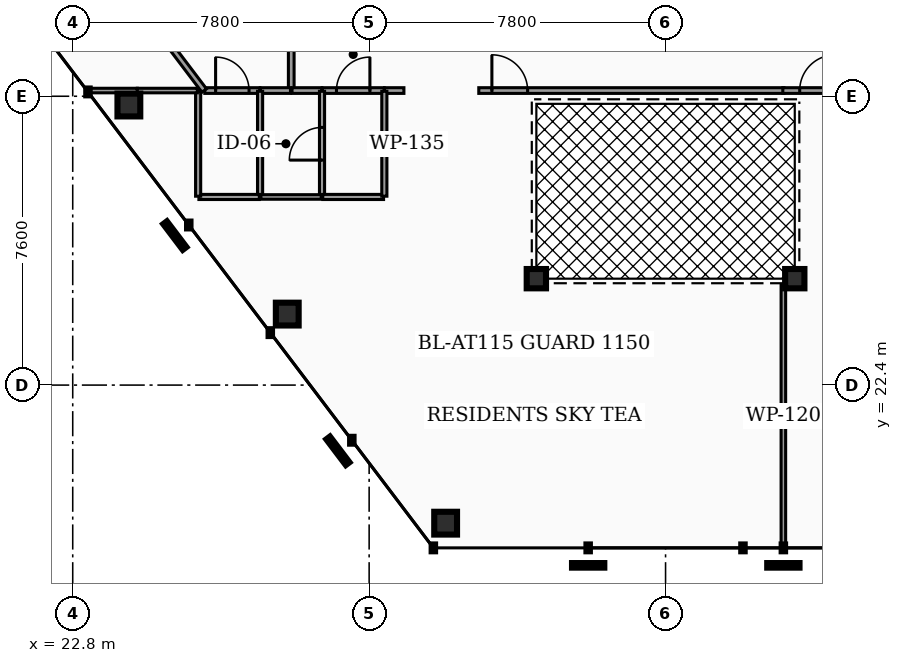
"""IFC4 building model, lengths in metres.
Left out: names, types, materials, properties, quantities, classifications, styles, units other than length and angle.
Written with IfcOpenShell. Run it as: python <this file> out.ifc"""

import sys

from ifc_helpers import new_model, si_unit, direction, frame, frame_2d, origin, origin_2d, place, context, subcontext, project, spatial, rectangle, hollow_rectangle, hollow_circle, extrude, element, fill, save


model = new_model("IFC4")
c1 = context("Model", 3, precision=1e-05, world=origin(), true_north=direction((0.0, 1.0)))
c2 = subcontext(c1, "Body", "Model", "MODEL_VIEW")
j1 = project(units=[si_unit("LENGTHUNIT", "METRE"), si_unit("PLANEANGLEUNIT", "RADIAN")], contexts=[c1])
p1 = place(None, origin())
s1 = spatial("IfcSite", under=j1, at=p1, CompositionType="ELEMENT")
p2 = place(p1, origin())
s2 = spatial("IfcBuilding", under=s1, at=p2, CompositionType="ELEMENT")
p3 = place(p2, frame((0.0, 0.0, 218.96)))
s3 = spatial("IfcBuildingStorey", under=s2, at=p3, CompositionType="ELEMENT", Elevation=218.96)
for number, where, z_axis, x_axis in (
    (1, (24.278, 29.769, 0.0), (0.0, 0.0, 1.0), (1.0, 0.0, 0.0)),
    (2, (28.445, 24.268, 0.0), (0.0, 0.0, 1.0), (1.0, 0.0, 0.0)),
    (3, (32.613, 18.767, 0.0), (0.0, 0.0, 1.0), (1.0, 0.0, 0.0)),
):
    element("IfcColumn", number, at=place(p3, frame(where, z_axis=z_axis, x_axis=x_axis)), inside=s3, PredefinedType="COLUMN", context=c2, shape_type="SweptSolid", body=[
        extrude(hollow_rectangle(XDim=0.6, YDim=0.6, WallThickness=0.03, at=origin_2d()), origin(), (0.0, 0.0, 1.0), 3.18),
    ])
for number, where, z_axis, x_axis in (
    (4, (35.0, 25.2, 0.0), (0.0, 0.0, 1.0), (1.0, 0.0, 0.0)),
    (5, (41.8, 25.2, 0.0), (0.0, 0.0, 1.0), (1.0, 0.0, 0.0)),
):
    element("IfcColumn", number, at=place(p3, frame(where, z_axis=z_axis, x_axis=x_axis)), inside=s3, PredefinedType="COLUMN", context=c2, shape_type="SweptSolid", body=[
        extrude(hollow_circle(Radius=0.254, WallThickness=0.02, at=origin_2d()), origin(), (0.0, 0.0, 1.0), 3.18),
    ])
p4 = place(p3, frame((28.55, 30.17, 0.0), z_axis=(0.0, 0.0, 1.0), x_axis=(0.0, 1.0, 0.0)))
e6 = element("IfcWall", 6, at=p4, inside=s3, PredefinedType="PARTITIONING", context=c2, shape_type="SweptSolid", body=[
    extrude(rectangle(XDim=3.06, YDim=0.15, at=frame_2d((1.53, 0.0))), origin(), (0.0, 0.0, 1.0), 2.235),
])
p5 = place(p4, frame((1.06, 0.0, 0.0)))
e7 = element("IfcOpeningElement", 7, at=p5, cuts=e6, PredefinedType="OPENING", context=c2, shape_type="SweptSolid", body=[
    extrude(rectangle(XDim=0.94, YDim=2.05, at=frame_2d((0.47, 1.025))), frame((0.0, 0.085, 0.0), z_axis=(0.0, -1.0, 0.0), x_axis=(1.0, 0.0, 0.0)), (0.0, 0.0, 1.0), 0.17),
])
p6 = place(p3, frame((29.365, 30.15, 0.0), z_axis=(0.0, 0.0, 1.0), x_axis=(1.0, 0.0, 0.0)))
e8 = element("IfcWall", 8, at=p6, inside=s3, PredefinedType="PARTITIONING", context=c2, shape_type="SweptSolid", body=[
    extrude(rectangle(XDim=1.63, YDim=0.15, at=frame_2d((0.815, 0.0))), origin(), (0.0, 0.0, 1.0), 2.235),
])
p7 = place(p6, frame((0.375, 0.0, 0.0)))
e9 = element("IfcOpeningElement", 9, at=p7, cuts=e8, PredefinedType="OPENING", context=c2, shape_type="SweptSolid", body=[
    extrude(rectangle(XDim=0.88, YDim=2.05, at=frame_2d((0.44, 1.025))), frame((0.0, 0.085, 0.0), z_axis=(0.0, -1.0, 0.0), x_axis=(1.0, 0.0, 0.0)), (0.0, 0.0, 1.0), 0.17),
])
p8 = place(p3, frame((28.57, 30.15, 0.0), z_axis=(0.0, 0.0, 1.0), x_axis=(1.0, 0.0, 0.0)))
e10 = element("IfcWall", 10, at=p8, inside=s3, PredefinedType="PARTITIONING", context=c2, shape_type="SweptSolid", body=[
    extrude(rectangle(XDim=0.785, YDim=0.15, at=frame_2d((0.393, 0.0))), origin(), (0.0, 0.0, 1.0), 2.235),
])
p9 = place(p3, frame((33.485, 30.15, 0.0), z_axis=(0.0, 0.0, 1.0), x_axis=(1.0, 0.0, 0.0)))
e11 = element("IfcWall", 11, at=p9, inside=s3, PredefinedType="PARTITIONING", context=c2, shape_type="SweptSolid", body=[
    extrude(rectangle(XDim=8.03, YDim=0.15, at=frame_2d((4.015, 0.0))), origin(), (0.0, 0.0, 1.0), 2.235),
])
p10 = place(p9, frame((0.345, 0.0, 0.0)))
e12 = element("IfcOpeningElement", 12, at=p10, cuts=e11, PredefinedType="OPENING", context=c2, shape_type="SweptSolid", body=[
    extrude(rectangle(XDim=0.94, YDim=2.05, at=frame_2d((0.47, 1.025))), frame((0.0, 0.085, 0.0), z_axis=(0.0, -1.0, 0.0), x_axis=(1.0, 0.0, 0.0)), (0.0, 0.0, 1.0), 0.17),
])
p11 = place(p3, frame((31.005, 30.15, 0.0), z_axis=(0.0, 0.0, 1.0), x_axis=(1.0, 0.0, 0.0)))
e13 = element("IfcWall", 13, at=p11, inside=s3, PredefinedType="PARTITIONING", context=c2, shape_type="SweptSolid", body=[
    extrude(rectangle(XDim=0.51, YDim=0.15, at=frame_2d((0.255, 0.0))), origin(), (0.0, 0.0, 1.0), 2.235),
])
p12 = place(p3, frame((41.485, 30.15, 0.0), z_axis=(0.0, 0.0, 1.0), x_axis=(1.0, 0.0, 0.0)))
e14 = element("IfcWall", 14, at=p12, inside=s3, PredefinedType="PARTITIONING", context=c2, shape_type="SweptSolid", body=[
    extrude(rectangle(XDim=1.83, YDim=0.15, at=frame_2d((0.915, 0.0))), origin(), (0.0, 0.0, 1.0), 2.235),
])
p13 = place(p12, frame((0.445, 0.0, 0.0)))
e15 = element("IfcOpeningElement", 15, at=p13, cuts=e14, PredefinedType="OPENING", context=c2, shape_type="SweptSolid", body=[
    extrude(rectangle(XDim=0.94, YDim=2.05, at=frame_2d((0.47, 1.025))), frame((0.0, 0.085, 0.0), z_axis=(0.0, -1.0, 0.0), x_axis=(1.0, 0.0, 0.0)), (0.0, 0.0, 1.0), 0.17),
])
p14 = place(p3, frame((26.275, 30.15, 0.0), z_axis=(0.0, 0.0, 1.0), x_axis=(1.0, 0.0, 0.0)))
e16 = element("IfcWall", 16, at=p14, inside=s3, PredefinedType="PARTITIONING", context=c2, shape_type="SweptSolid", body=[
    extrude(rectangle(XDim=1.45, YDim=0.15, at=frame_2d((0.725, 0.0))), origin(), (0.0, 0.0, 1.0), 2.235),
])
p15 = place(p14, frame((0.285, 0.0, 0.0)))
e17 = element("IfcOpeningElement", 17, at=p15, cuts=e16, PredefinedType="OPENING", context=c2, shape_type="SweptSolid", body=[
    extrude(rectangle(XDim=0.88, YDim=2.05, at=frame_2d((0.44, 1.025))), frame((0.0, 0.085, 0.0), z_axis=(0.0, -1.0, 0.0), x_axis=(1.0, 0.0, 0.0)), (0.0, 0.0, 1.0), 0.17),
])
p16 = place(p3, frame((27.735, 30.15, 0.0), z_axis=(0.0, 0.0, 1.0), x_axis=(1.0, 0.0, 0.0)))
e18 = element("IfcWall", 18, at=p16, inside=s3, PredefinedType="PARTITIONING", context=c2, shape_type="SweptSolid", body=[
    extrude(rectangle(XDim=0.795, YDim=0.15, at=frame_2d((0.397, 0.0))), origin(), (0.0, 0.0, 1.0), 2.235),
])
p17 = place(p3, frame((24.757, 32.134, 0.0), z_axis=(0.0, 0.0, 1.0), x_axis=(0.603806698968, -0.797130773638, 0.0)))
e19 = element("IfcWall", 19, at=p17, inside=s3, PredefinedType="PARTITIONING", context=c2, shape_type="SweptSolid", body=[
    extrude(rectangle(XDim=2.489, YDim=0.15, at=frame_2d((1.245, 0.0))), origin(), (0.0, 0.0, 1.0), 2.235),
])
p18 = place(p3, frame((29.36, 27.37, 0.0), z_axis=(0.0, 0.0, 1.0), x_axis=(0.0, 1.0, 0.0)))
e20 = element("IfcWall", 20, at=p18, inside=s3, PredefinedType="PARTITIONING", context=c2, shape_type="SweptSolid", body=[
    extrude(rectangle(XDim=2.76, YDim=0.135, at=frame_2d((1.38, 0.0))), origin(), (0.0, 0.0, 1.0), 2.235),
])
p19 = place(p18, frame((0.95, 0.0, 0.0)))
e21 = element("IfcOpeningElement", 21, at=p19, cuts=e20, PredefinedType="OPENING", context=c2, shape_type="SweptSolid", body=[
    extrude(rectangle(XDim=0.86, YDim=2.05, at=frame_2d((0.43, 1.025))), frame((0.0, 0.077, 0.0), z_axis=(0.0, -1.0, 0.0), x_axis=(1.0, 0.0, 0.0)), (0.0, 0.0, 1.0), 0.155),
])
p20 = place(p3, frame((29.38, 27.35, 0.0), z_axis=(0.0, 0.0, 1.0), x_axis=(1.0, 0.0, 0.0)))
e22 = element("IfcWall", 22, at=p20, inside=s3, PredefinedType="PARTITIONING", context=c2, shape_type="SweptSolid", body=[
    extrude(rectangle(XDim=1.6, YDim=0.135, at=frame_2d((0.8, 0.0))), origin(), (0.0, 0.0, 1.0), 2.235),
])
for number, where, z_axis, x_axis in (
    (23, (31.0, 27.37, 0.0), (0.0, 0.0, 1.0), (0.0, 1.0, 0.0)),
    (24, (27.73, 27.37, 0.0), (0.0, 0.0, 1.0), (0.0, 1.0, 0.0)),
):
    element("IfcWall", number, at=place(p3, frame(where, z_axis=z_axis, x_axis=x_axis)), inside=s3, PredefinedType="PARTITIONING", context=c2, shape_type="SweptSolid", body=[
        extrude(rectangle(XDim=2.76, YDim=0.135, at=frame_2d((1.38, 0.0))), origin(), (0.0, 0.0, 1.0), 2.235),
    ])
p21 = place(p3, frame((26.12, 27.35, 0.0), z_axis=(0.0, 0.0, 1.0), x_axis=(1.0, 0.0, 0.0)))
e25 = element("IfcWall", 25, at=p21, inside=s3, PredefinedType="PARTITIONING", context=c2, shape_type="SweptSolid", body=[
    extrude(rectangle(XDim=1.59, YDim=0.135, at=frame_2d((0.795, 0.0))), origin(), (0.0, 0.0, 1.0), 2.235),
])
p22 = place(p3, frame((26.1, 27.37, 0.0), z_axis=(0.0, 0.0, 1.0), x_axis=(0.0, 1.0, 0.0)))
e26 = element("IfcWall", 26, at=p22, inside=s3, PredefinedType="PARTITIONING", context=c2, shape_type="SweptSolid", body=[
    extrude(rectangle(XDim=2.76, YDim=0.135, at=frame_2d((1.38, 0.0))), origin(), (0.0, 0.0, 1.0), 2.235),
])
p23 = place(p3, frame((27.75, 27.35, 0.0), z_axis=(0.0, 0.0, 1.0), x_axis=(1.0, 0.0, 0.0)))
e27 = element("IfcWall", 27, at=p23, inside=s3, PredefinedType="PARTITIONING", context=c2, shape_type="SweptSolid", body=[
    extrude(rectangle(XDim=1.59, YDim=0.12, at=frame_2d((0.795, 0.0))), origin(), (0.0, 0.0, 1.0), 2.235),
])
p24 = place(p3, frame((41.5, 18.132, 0.0), z_axis=(0.0, 0.0, 1.0), x_axis=(0.0, 1.0, 0.0)))
e28 = element("IfcWall", 28, at=p24, inside=s3, PredefinedType="PARTITIONING", context=c2, shape_type="SweptSolid", body=[
    extrude(rectangle(XDim=6.888, YDim=0.12, at=frame_2d((3.444, 0.0))), origin(), (0.0, 0.0, 1.0), 2.235),
])
p25 = place(p3, frame((23.189, 30.15, 0.0), z_axis=(0.0, 0.0, 1.0), x_axis=(1.0, 0.0, 0.0)))
e29 = element("IfcWall", 29, at=p25, inside=s3, PredefinedType="PARTITIONING", context=c2, shape_type="SweptSolid", body=[
    extrude(rectangle(XDim=1.311, YDim=0.12, at=frame_2d((0.656, 0.0))), origin(), (0.0, 0.0, 1.0), 2.235),
])
p26 = place(p3, frame((24.5, 30.15, 0.0), z_axis=(0.0, 0.0, 1.0), x_axis=(1.0, 0.0, 0.0)))
e30 = element("IfcWall", 30, at=p26, inside=s3, PredefinedType="PARTITIONING", context=c2, shape_type="SweptSolid", body=[
    extrude(rectangle(XDim=1.58, YDim=0.12, at=frame_2d((0.79, 0.0))), origin(), (0.0, 0.0, 1.0), 2.235),
])
p27 = place(p7, origin())
e31 = element("IfcDoor", 31, at=p27, inside=s3, OperationType="SINGLE_SWING_RIGHT", PredefinedType="DOOR", context=c2, shape_type="SweptSolid", body=[
    extrude(rectangle(XDim=0.88, YDim=2.05, at=frame_2d((0.44, 1.025))), frame((0.0, 0.025, 0.0), z_axis=(0.0, -1.0, 0.0), x_axis=(1.0, 0.0, 0.0)), (0.0, 0.0, 1.0), 0.05),
])
fill(e9, e31)
p28 = place(p10, origin())
e32 = element("IfcDoor", 32, at=p28, inside=s3, OperationType="SINGLE_SWING_LEFT", PredefinedType="DOOR", context=c2, shape_type="SweptSolid", body=[
    extrude(rectangle(XDim=0.94, YDim=2.05, at=frame_2d((0.47, 1.025))), frame((0.0, 0.025, 0.0), z_axis=(0.0, -1.0, 0.0), x_axis=(1.0, 0.0, 0.0)), (0.0, 0.0, 1.0), 0.05),
])
fill(e12, e32)
p29 = place(p13, origin())
e33 = element("IfcDoor", 33, at=p29, inside=s3, OperationType="SINGLE_SWING_RIGHT", PredefinedType="DOOR", context=c2, shape_type="SweptSolid", body=[
    extrude(rectangle(XDim=0.94, YDim=2.05, at=frame_2d((0.47, 1.025))), frame((0.0, 0.025, 0.0), z_axis=(0.0, -1.0, 0.0), x_axis=(1.0, 0.0, 0.0)), (0.0, 0.0, 1.0), 0.05),
])
fill(e15, e33)
p30 = place(p15, origin())
e34 = element("IfcDoor", 34, at=p30, inside=s3, OperationType="SINGLE_SWING_LEFT", PredefinedType="DOOR", context=c2, shape_type="SweptSolid", body=[
    extrude(rectangle(XDim=0.88, YDim=2.05, at=frame_2d((0.44, 1.025))), frame((0.0, 0.025, 0.0), z_axis=(0.0, -1.0, 0.0), x_axis=(1.0, 0.0, 0.0)), (0.0, 0.0, 1.0), 0.05),
])
fill(e17, e34)
p31 = place(p19, origin())
e35 = element("IfcDoor", 35, at=p31, inside=s3, OperationType="SINGLE_SWING_LEFT", PredefinedType="DOOR", context=c2, shape_type="SweptSolid", body=[
    extrude(rectangle(XDim=0.86, YDim=2.05, at=frame_2d((0.43, 1.025))), frame((0.0, 0.025, 0.0), z_axis=(0.0, -1.0, 0.0), x_axis=(1.0, 0.0, 0.0)), (0.0, 0.0, 1.0), 0.05),
])
fill(e21, e35)
save(model, sys.argv[1])
